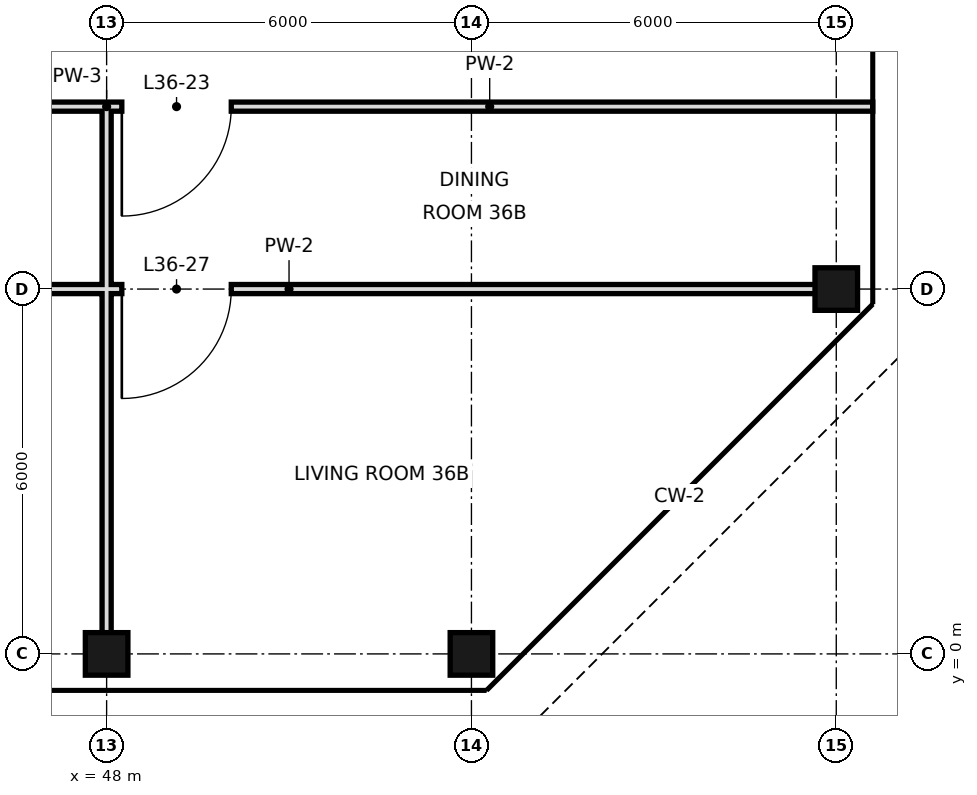
"""IFC4 building model, lengths in metres.
Left out: names, types, materials, properties, quantities, classifications, styles, units other than length and angle.
Written with IfcOpenShell. Run it as: python <this file> out.ifc"""

import sys

from ifc_helpers import new_model, si_unit, direction, frame, frame_2d, origin, origin_2d, place, context, subcontext, project, spatial, rectangle, hollow_rectangle, extrude, element, fill, save


model = new_model("IFC4")
c1 = context("Model", 3, precision=1e-05, world=origin(), true_north=direction((0.0, 1.0)))
c2 = subcontext(c1, "Body", "Model", "MODEL_VIEW")
j1 = project(units=[si_unit("LENGTHUNIT", "METRE"), si_unit("PLANEANGLEUNIT", "RADIAN")], contexts=[c1])
p1 = place(None, origin())
s1 = spatial("IfcSite", under=j1, at=p1, CompositionType="ELEMENT")
p2 = place(p1, origin())
s2 = spatial("IfcBuilding", under=s1, at=p2, CompositionType="ELEMENT")
p3 = place(p2, frame((0.0, 0.0, 158.2)))
s3 = spatial("IfcBuildingStorey", under=s2, at=p3, CompositionType="ELEMENT", Elevation=158.2)
for number, where, z_axis, x_axis in (
    (1, (48.0, 0.0, 0.0), (0.0, 0.0, 1.0), (1.0, 0.0, 0.0)),
    (2, (54.0, 0.0, 0.0), (0.0, 0.0, 1.0), (1.0, 0.0, 0.0)),
    (3, (60.0, 6.0, 0.0), (0.0, 0.0, 1.0), (1.0, 0.0, 0.0)),
):
    element("IfcColumn", number, at=place(p3, frame(where, z_axis=z_axis, x_axis=x_axis)), inside=s3, PredefinedType="COLUMN", context=c2, shape_type="SweptSolid", body=[
        extrude(hollow_rectangle(XDim=0.7, YDim=0.7, WallThickness=0.036, at=origin_2d()), origin(), (0.0, 0.0, 1.0), 3.6),
    ])
p4 = place(p3, frame((48.0, 0.0, 0.0), z_axis=(0.0, 0.0, 1.0), x_axis=(0.0, 1.0, 0.0)))
e4 = element("IfcWall", 4, at=p4, inside=s3, PredefinedType="PARTITIONING", context=c2, shape_type="SweptSolid", body=[
    extrude(rectangle(XDim=6.0, YDim=0.15, at=frame_2d((3.0, 0.0))), origin(), (0.0, 0.0, 1.0), 2.68),
])
p5 = place(p3, frame((48.0, 6.0, 0.0), z_axis=(0.0, 0.0, 1.0), x_axis=(0.0, 1.0, 0.0)))
e5 = element("IfcWall", 5, at=p5, inside=s3, PredefinedType="PARTITIONING", context=c2, shape_type="SweptSolid", body=[
    extrude(rectangle(XDim=3.0, YDim=0.15, at=frame_2d((1.5, 0.0))), origin(), (0.0, 0.0, 1.0), 2.68),
])
p6 = place(p3, frame((48.0, 6.0, 0.0), z_axis=(0.0, 0.0, 1.0), x_axis=(1.0, 0.0, 0.0)))
e6 = element("IfcWall", 6, at=p6, inside=s3, PredefinedType="PARTITIONING", context=c2, shape_type="SweptSolid", body=[
    extrude(rectangle(XDim=12.0, YDim=0.15, at=frame_2d((6.0, 0.0))), origin(), (0.0, 0.0, 1.0), 2.68),
])
p7 = place(p6, frame((0.25, 0.0, 0.0)))
e7 = element("IfcOpeningElement", 7, at=p7, cuts=e6, PredefinedType="OPENING", context=c2, shape_type="SweptSolid", body=[
    extrude(rectangle(XDim=1.8, YDim=2.4, at=frame_2d((0.9, 1.2))), frame((0.0, 0.085, 0.0), z_axis=(0.0, -1.0, 0.0), x_axis=(1.0, 0.0, 0.0)), (0.0, 0.0, 1.0), 0.17),
])
p8 = place(p3, frame((39.6, 6.0, 0.0), z_axis=(0.0, 0.0, 1.0), x_axis=(1.0, 0.0, 0.0)))
e8 = element("IfcWall", 8, at=p8, inside=s3, PredefinedType="PARTITIONING", context=c2, shape_type="SweptSolid", body=[
    extrude(rectangle(XDim=8.4, YDim=0.15, at=frame_2d((4.2, 0.0))), origin(), (0.0, 0.0, 1.0), 2.93),
])
p9 = place(p8, frame((0.75, 0.0, 0.0)))
e9 = element("IfcOpeningElement", 9, at=p9, cuts=e8, PredefinedType="OPENING", context=c2, shape_type="SweptSolid", body=[
    extrude(rectangle(XDim=0.9, YDim=2.4, at=frame_2d((0.45, 1.2))), frame((0.0, 0.085, 0.0), z_axis=(0.0, -1.0, 0.0), x_axis=(1.0, 0.0, 0.0)), (0.0, 0.0, 1.0), 0.17),
])
p10 = place(p3, frame((48.0, 9.0, 0.0), z_axis=(0.0, 0.0, 1.0), x_axis=(1.0, 0.0, 0.0)))
e10 = element("IfcWall", 10, at=p10, inside=s3, PredefinedType="PARTITIONING", context=c2, shape_type="SweptSolid", body=[
    extrude(rectangle(XDim=12.6, YDim=0.15, at=frame_2d((6.3, 0.0))), origin(), (0.0, 0.0, 1.0), 3.38),
])
p11 = place(p10, frame((0.25, 0.0, 0.0)))
e11 = element("IfcOpeningElement", 11, at=p11, cuts=e10, PredefinedType="OPENING", context=c2, shape_type="SweptSolid", body=[
    extrude(rectangle(XDim=1.8, YDim=2.4, at=frame_2d((0.9, 1.2))), frame((0.0, 0.085, 0.0), z_axis=(0.0, -1.0, 0.0), x_axis=(1.0, 0.0, 0.0)), (0.0, 0.0, 1.0), 0.17),
])
p12 = place(p3, frame((39.6, 9.0, 0.0), z_axis=(0.0, 0.0, 1.0), x_axis=(1.0, 0.0, 0.0)))
e12 = element("IfcWall", 12, at=p12, inside=s3, PredefinedType="PARTITIONING", context=c2, shape_type="SweptSolid", body=[
    extrude(rectangle(XDim=8.4, YDim=0.15, at=frame_2d((4.2, 0.0))), origin(), (0.0, 0.0, 1.0), 3.38),
])
p13 = place(p11, frame((1.8, 0.0, 0.0), z_axis=(0.0, 0.0, 1.0), x_axis=(-1.0, 0.0, 0.0)))
e13 = element("IfcDoor", 13, at=p13, inside=s3, OperationType="SINGLE_SWING_RIGHT", PredefinedType="DOOR", context=c2, shape_type="SweptSolid", body=[
    extrude(rectangle(XDim=1.8, YDim=2.4, at=frame_2d((0.9, 1.2))), frame((0.0, 0.025, 0.0), z_axis=(0.0, -1.0, 0.0), x_axis=(1.0, 0.0, 0.0)), (0.0, 0.0, 1.0), 0.05),
])
fill(e11, e13)
p14 = place(p7, frame((1.8, 0.0, 0.0), z_axis=(0.0, 0.0, 1.0), x_axis=(-1.0, 0.0, 0.0)))
e14 = element("IfcDoor", 14, at=p14, inside=s3, OperationType="SINGLE_SWING_RIGHT", PredefinedType="DOOR", context=c2, shape_type="SweptSolid", body=[
    extrude(rectangle(XDim=1.8, YDim=2.4, at=frame_2d((0.9, 1.2))), frame((0.0, 0.025, 0.0), z_axis=(0.0, -1.0, 0.0), x_axis=(1.0, 0.0, 0.0)), (0.0, 0.0, 1.0), 0.05),
])
fill(e7, e14)
save(model, sys.argv[1])
